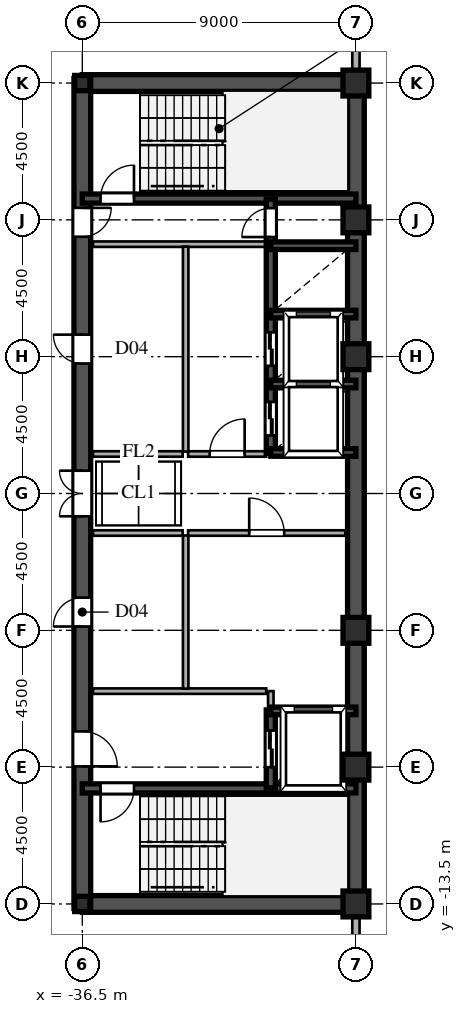
"""IFC4 building model, lengths in metres.
Left out: names, types, materials, properties, quantities, classifications, styles, units other than length and angle.
Written with IfcOpenShell. Run it as: python <this file> out.ifc"""

import sys

from ifc_helpers import new_model, si_unit, direction, frame, frame_2d, origin, origin_2d, place, context, subcontext, project, spatial, rectangle, hollow_rectangle, i_section, extrude, source, transform, mapped, element, fill, save


model = new_model("IFC4")
c1 = context("Model", 3, precision=1e-05, world=origin(), true_north=direction((0.0, 1.0)))
c2 = subcontext(c1, "Body", "Model", "MODEL_VIEW")
j1 = project(units=[si_unit("LENGTHUNIT", "METRE"), si_unit("PLANEANGLEUNIT", "RADIAN")], contexts=[c1])
p1 = place(None, origin())
s1 = spatial("IfcSite", under=j1, at=p1, CompositionType="ELEMENT")
p2 = place(p1, origin())
s2 = spatial("IfcBuilding", under=s1, at=p2, CompositionType="ELEMENT")
p3 = place(p2, frame((0.0, 0.0, 199.5)))
s3 = spatial("IfcBuildingStorey", under=s2, at=p3, CompositionType="ELEMENT", Elevation=199.5)
m1 = source(origin(), c2, "Body", "SweptSolid", [
    extrude(hollow_rectangle(XDim=0.85, YDim=0.85, WallThickness=0.036, at=origin_2d()), origin(), (0.0, 0.0, 1.0), 3.6),
])
for number, where, z_axis, x_axis in (
    (1, (-27.5, -13.5, 0.0), (0.0, 0.0, 1.0), (1.0, 0.0, 0.0)),
    (2, (-27.5, -9.0, 0.0), (0.0, 0.0, 1.0), (1.0, 0.0, 0.0)),
    (3, (-27.5, -4.5, 0.0), (0.0, 0.0, 1.0), (1.0, 0.0, 0.0)),
    (4, (-27.5, 4.5, 0.0), (0.0, 0.0, 1.0), (1.0, 0.0, 0.0)),
    (5, (-27.5, 9.0, 0.0), (0.0, 0.0, 1.0), (1.0, 0.0, 0.0)),
    (6, (-27.5, 13.5, 0.0), (0.0, 0.0, 1.0), (1.0, 0.0, 0.0)),
):
    element("IfcColumn", number, at=place(p3, frame(where, z_axis=z_axis, x_axis=x_axis)), inside=s3, PredefinedType="COLUMN", context=c2, shape_type="MappedRepresentation", body=[
        mapped(m1, transform((0.0, 0.0, 0.0), scale=1.0)),
    ])
m2 = source(origin(), c2, "Body", "SweptSolid", [
    extrude(i_section(OverallWidth=0.5, OverallDepth=0.5, WebThickness=0.02, FlangeThickness=0.032, at=origin_2d()), origin(), (0.0, 0.0, 1.0), 3.6),
])
for number, where, z_axis, x_axis in (
    (7, (-36.5, -13.5, 0.0), (0.0, 0.0, 1.0), (1.0, 0.0, 0.0)),
    (8, (-36.5, 13.5, 0.0), (0.0, 0.0, 1.0), (1.0, 0.0, 0.0)),
):
    element("IfcColumn", number, at=place(p3, frame(where, z_axis=z_axis, x_axis=x_axis)), inside=s3, PredefinedType="COLUMN", context=c2, shape_type="MappedRepresentation", body=[
        mapped(m2, transform((0.0, 0.0, 0.0), scale=1.0)),
    ])
p4 = place(p3, frame((-27.5, -15.98, 0.0), z_axis=(0.0, 0.0, 1.0), x_axis=(0.0, 1.0, 0.0)))
e9 = element("IfcWall", 9, at=p4, inside=s3, PredefinedType="SOLIDWALL", context=c2, shape_type="SweptSolid", body=[
    extrude(rectangle(XDim=1.6, YDim=0.24, at=frame_2d((0.8, 0.0))), origin(), (0.0, 0.0, 1.0), 3.38),
])
for number, where, z_axis, x_axis in (
    (10, (-27.5, -14.38, 0.0), (0.0, 0.0, 1.0), (0.0, 1.0, 0.0)),
    (11, (-27.5, 13.78, 0.0), (0.0, 0.0, 1.0), (0.0, 1.0, 0.0)),
):
    element("IfcWall", number, at=place(p3, frame(where, z_axis=z_axis, x_axis=x_axis)), inside=s3, PredefinedType="SOLIDWALL", context=c2, shape_type="SweptSolid", body=[
        extrude(rectangle(XDim=0.6, YDim=0.24, at=frame_2d((0.3, 0.0))), origin(), (0.0, 0.0, 1.0), 2.88),
    ])
p5 = place(p3, frame((-27.5, 14.38, 0.0), z_axis=(0.0, 0.0, 1.0), x_axis=(0.0, 1.0, 0.0)))
e12 = element("IfcWall", 12, at=p5, inside=s3, PredefinedType="SOLIDWALL", context=c2, shape_type="SweptSolid", body=[
    extrude(rectangle(XDim=1.6, YDim=0.24, at=frame_2d((0.8, 0.0))), origin(), (0.0, 0.0, 1.0), 3.38),
])
for number, where, z_axis, x_axis in (
    (13, (-27.5, -13.5, 0.0), (0.0, 0.0, 1.0), (0.0, 1.0, 0.0)),
    (14, (-27.5, 1.3, 0.0), (0.0, 0.0, 1.0), (0.0, 1.0, 0.0)),
):
    element("IfcWall", number, at=place(p3, frame(where, z_axis=z_axis, x_axis=x_axis)), inside=s3, PredefinedType="SHEAR", context=c2, shape_type="SweptSolid", body=[
        extrude(rectangle(XDim=12.2, YDim=0.55, at=frame_2d((6.1, 0.0))), origin(), (0.0, 0.0, 1.0), 3.38),
    ])
p6 = place(p3, frame((-27.5, -1.3, 0.0), z_axis=(0.0, 0.0, 1.0), x_axis=(0.0, 1.0, 0.0)))
e15 = element("IfcWall", 15, at=p6, inside=s3, PredefinedType="SHEAR", context=c2, shape_type="SweptSolid", body=[
    extrude(rectangle(XDim=2.6, YDim=0.55, at=frame_2d((1.3, 0.0))), origin(), (0.0, 0.0, 1.0), 3.38),
])
for number, where, z_axis, x_axis in (
    (16, (-36.5, -13.5, 0.0), (0.0, 0.0, 1.0), (1.0, 0.0, 0.0)),
    (17, (-36.5, 13.5, 0.0), (0.0, 0.0, 1.0), (1.0, 0.0, 0.0)),
):
    element("IfcWall", number, at=place(p3, frame(where, z_axis=z_axis, x_axis=x_axis)), inside=s3, PredefinedType="SHEAR", context=c2, shape_type="SweptSolid", body=[
        extrude(rectangle(XDim=9.0, YDim=0.55, at=frame_2d((4.5, 0.0))), origin(), (0.0, 0.0, 1.0), 3.38),
    ])
p7 = place(p3, frame((-36.5, -13.65, 0.0), z_axis=(0.0, 0.0, 1.0), x_axis=(0.0, 1.0, 0.0)))
e18 = element("IfcWall", 18, at=p7, inside=s3, PredefinedType="SHEAR", context=c2, shape_type="SweptSolid", body=[
    extrude(rectangle(XDim=7.15, YDim=0.55, at=frame_2d((3.575, 0.0))), origin(), (0.0, 0.0, 1.0), 3.38),
])
p8 = place(p7, frame((4.675, 0.0, 0.0)))
e19 = element("IfcOpeningElement", 19, at=p8, cuts=e18, PredefinedType="OPENING", context=c2, shape_type="SweptSolid", body=[
    extrude(rectangle(XDim=1.15, YDim=2.2, at=frame_2d((0.575, 1.1))), frame((0.0, 0.285, 0.0), z_axis=(0.0, -1.0, 0.0), x_axis=(1.0, 0.0, 0.0)), (0.0, 0.0, 1.0), 0.57),
])
p9 = place(p3, frame((-36.5, -1.3, 0.0), z_axis=(0.0, 0.0, 1.0), x_axis=(0.0, 1.0, 0.0)))
e20 = element("IfcWall", 20, at=p9, inside=s3, PredefinedType="SHEAR", context=c2, shape_type="SweptSolid", body=[
    extrude(rectangle(XDim=2.6, YDim=0.55, at=frame_2d((1.3, 0.0))), origin(), (0.0, 0.0, 1.0), 3.38),
])
p10 = place(p9, frame((0.55, 0.0, 0.0)))
e21 = element("IfcOpeningElement", 21, at=p10, cuts=e20, PredefinedType="OPENING", context=c2, shape_type="SweptSolid", body=[
    extrude(rectangle(XDim=1.5, YDim=2.3, at=frame_2d((0.75, 1.15))), frame((0.0, 0.285, 0.0), z_axis=(0.0, -1.0, 0.0), x_axis=(1.0, 0.0, 0.0)), (0.0, 0.0, 1.0), 0.57),
])
p11 = place(p3, frame((-36.5, 8.2, 0.0), z_axis=(0.0, 0.0, 1.0), x_axis=(0.0, 1.0, 0.0)))
e22 = element("IfcWall", 22, at=p11, inside=s3, PredefinedType="SHEAR", context=c2, shape_type="SweptSolid", body=[
    extrude(rectangle(XDim=5.45, YDim=0.55, at=frame_2d((2.725, 0.0))), origin(), (0.0, 0.0, 1.0), 3.38),
])
p12 = place(p11, frame((0.245, 0.0, 0.0)))
e23 = element("IfcOpeningElement", 23, at=p12, cuts=e22, PredefinedType="OPENING", context=c2, shape_type="SweptSolid", body=[
    extrude(rectangle(XDim=0.95, YDim=2.15, at=frame_2d((0.475, 1.075))), frame((0.0, 0.285, 0.0), z_axis=(0.0, -1.0, 0.0), x_axis=(1.0, 0.0, 0.0)), (0.0, 0.0, 1.0), 0.57),
])
p13 = place(p3, frame((-36.5, -6.5, 0.0), z_axis=(0.0, 0.0, 1.0), x_axis=(0.0, 1.0, 0.0)))
e24 = element("IfcWall", 24, at=p13, inside=s3, PredefinedType="SHEAR", context=c2, shape_type="SweptSolid", body=[
    extrude(rectangle(XDim=5.2, YDim=0.55, at=frame_2d((2.6, 0.0))), origin(), (0.0, 0.0, 1.0), 3.38),
])
p14 = place(p13, frame((2.125, 0.0, 0.0)))
e25 = element("IfcOpeningElement", 25, at=p14, cuts=e24, PredefinedType="OPENING", context=c2, shape_type="SweptSolid", body=[
    extrude(rectangle(XDim=0.95, YDim=2.15, at=frame_2d((0.475, 1.075))), frame((0.0, 0.285, 0.0), z_axis=(0.0, -1.0, 0.0), x_axis=(1.0, 0.0, 0.0)), (0.0, 0.0, 1.0), 0.57),
])
p15 = place(p3, frame((-36.5, 1.3, 0.0), z_axis=(0.0, 0.0, 1.0), x_axis=(0.0, 1.0, 0.0)))
e26 = element("IfcWall", 26, at=p15, inside=s3, PredefinedType="SHEAR", context=c2, shape_type="SweptSolid", body=[
    extrude(rectangle(XDim=6.9, YDim=0.55, at=frame_2d((3.45, 0.0))), origin(), (0.0, 0.0, 1.0), 3.38),
])
p16 = place(p15, frame((2.975, 0.0, 0.0)))
e27 = element("IfcOpeningElement", 27, at=p16, cuts=e26, PredefinedType="OPENING", context=c2, shape_type="SweptSolid", body=[
    extrude(rectangle(XDim=0.95, YDim=2.15, at=frame_2d((0.475, 1.075))), frame((0.0, 0.285, 0.0), z_axis=(0.0, -1.0, 0.0), x_axis=(1.0, 0.0, 0.0)), (0.0, 0.0, 1.0), 0.57),
])
p17 = place(p3, frame((-36.5, -9.7, 0.0), z_axis=(0.0, 0.0, 1.0), x_axis=(1.0, 0.0, 0.0)))
e28 = element("IfcWall", 28, at=p17, inside=s3, PredefinedType="SHEAR", context=c2, shape_type="SweptSolid", body=[
    extrude(rectangle(XDim=9.0, YDim=0.3, at=frame_2d((4.5, 0.0))), origin(), (0.0, 0.0, 1.0), 3.38),
])
p18 = place(p17, frame((0.6, 0.0, 0.0)))
e29 = element("IfcOpeningElement", 29, at=p18, cuts=e28, PredefinedType="OPENING", context=c2, shape_type="SweptSolid", body=[
    extrude(rectangle(XDim=1.1, YDim=2.2, at=frame_2d((0.55, 1.1))), frame((0.0, 0.16, 0.0), z_axis=(0.0, -1.0, 0.0), x_axis=(1.0, 0.0, 0.0)), (0.0, 0.0, 1.0), 0.32),
])
p19 = place(p3, frame((-36.5, 9.7, 0.0), z_axis=(0.0, 0.0, 1.0), x_axis=(1.0, 0.0, 0.0)))
e30 = element("IfcWall", 30, at=p19, inside=s3, PredefinedType="SHEAR", context=c2, shape_type="SweptSolid", body=[
    extrude(rectangle(XDim=9.0, YDim=0.3, at=frame_2d((4.5, 0.0))), origin(), (0.0, 0.0, 1.0), 3.38),
])
p20 = place(p19, frame((0.6, 0.0, 0.0)))
e31 = element("IfcOpeningElement", 31, at=p20, cuts=e30, PredefinedType="OPENING", context=c2, shape_type="SweptSolid", body=[
    extrude(rectangle(XDim=1.1, YDim=2.2, at=frame_2d((0.55, 1.1))), frame((0.0, 0.16, 0.0), z_axis=(0.0, -1.0, 0.0), x_axis=(1.0, 0.0, 0.0)), (0.0, 0.0, 1.0), 0.32),
])
for number, where, z_axis, x_axis in (
    (32, (-30.3, -7.15, 0.0), (0.0, 0.0, 1.0), (1.0, 0.0, 0.0)),
    (33, (-30.3, 1.35, 0.0), (0.0, 0.0, 1.0), (1.0, 0.0, 0.0)),
    (34, (-30.3, 3.6, 0.0), (0.0, 0.0, 1.0), (1.0, 0.0, 0.0)),
    (35, (-30.3, 5.9, 0.0), (0.0, 0.0, 1.0), (1.0, 0.0, 0.0)),
    (36, (-30.3, 8.15, 0.0), (0.0, 0.0, 1.0), (1.0, 0.0, 0.0)),
):
    element("IfcWall", number, at=place(p3, frame(where, z_axis=z_axis, x_axis=x_axis)), inside=s3, PredefinedType="SHEAR", context=c2, shape_type="SweptSolid", body=[
        extrude(rectangle(XDim=2.8, YDim=0.25, at=frame_2d((1.4, 0.0))), origin(), (0.0, 0.0, 1.0), 3.38),
    ])
p21 = place(p3, frame((-30.3, -9.68, 0.0), z_axis=(0.0, 0.0, 1.0), x_axis=(0.0, 1.0, 0.0)))
e37 = element("IfcWall", 37, at=p21, inside=s3, PredefinedType="SHEAR", context=c2, shape_type="SweptSolid", body=[
    extrude(rectangle(XDim=2.56, YDim=0.3, at=frame_2d((1.28, 0.0))), origin(), (0.0, 0.0, 1.0), 3.38),
])
p22 = place(p21, frame((0.68, 0.0, 0.0)))
e38 = element("IfcOpeningElement", 38, at=p22, cuts=e37, PredefinedType="OPENING", context=c2, shape_type="SweptSolid", body=[
    extrude(rectangle(XDim=1.2, YDim=2.25, at=frame_2d((0.6, 1.125))), frame((0.0, 0.16, 0.0), z_axis=(0.0, -1.0, 0.0), x_axis=(1.0, 0.0, 0.0)), (0.0, 0.0, 1.0), 0.32),
])
p23 = place(p3, frame((-30.3, 1.32, 0.0), z_axis=(0.0, 0.0, 1.0), x_axis=(0.0, 1.0, 0.0)))
e39 = element("IfcWall", 39, at=p23, inside=s3, PredefinedType="SHEAR", context=c2, shape_type="SweptSolid", body=[
    extrude(rectangle(XDim=2.28, YDim=0.3, at=frame_2d((1.14, 0.0))), origin(), (0.0, 0.0, 1.0), 3.38),
])
p24 = place(p23, frame((0.59, 0.0, 0.0)))
e40 = element("IfcOpeningElement", 40, at=p24, cuts=e39, PredefinedType="OPENING", context=c2, shape_type="SweptSolid", body=[
    extrude(rectangle(XDim=1.1, YDim=2.2, at=frame_2d((0.55, 1.1))), frame((0.0, 0.16, 0.0), z_axis=(0.0, -1.0, 0.0), x_axis=(1.0, 0.0, 0.0)), (0.0, 0.0, 1.0), 0.32),
])
p25 = place(p3, frame((-30.3, 3.6, 0.0), z_axis=(0.0, 0.0, 1.0), x_axis=(0.0, 1.0, 0.0)))
e41 = element("IfcWall", 41, at=p25, inside=s3, PredefinedType="SHEAR", context=c2, shape_type="SweptSolid", body=[
    extrude(rectangle(XDim=2.3, YDim=0.3, at=frame_2d((1.15, 0.0))), origin(), (0.0, 0.0, 1.0), 3.38),
])
p26 = place(p25, frame((0.6, 0.0, 0.0)))
e42 = element("IfcOpeningElement", 42, at=p26, cuts=e41, PredefinedType="OPENING", context=c2, shape_type="SweptSolid", body=[
    extrude(rectangle(XDim=1.1, YDim=2.2, at=frame_2d((0.55, 1.1))), frame((0.0, 0.16, 0.0), z_axis=(0.0, -1.0, 0.0), x_axis=(1.0, 0.0, 0.0)), (0.0, 0.0, 1.0), 0.32),
])
p27 = place(p3, frame((-30.3, 5.9, 0.0), z_axis=(0.0, 0.0, 1.0), x_axis=(0.0, 1.0, 0.0)))
e43 = element("IfcWall", 43, at=p27, inside=s3, PredefinedType="SHEAR", context=c2, shape_type="SweptSolid", body=[
    extrude(rectangle(XDim=2.25, YDim=0.3, at=frame_2d((1.125, 0.0))), origin(), (0.0, 0.0, 1.0), 3.38),
])
p28 = place(p3, frame((-30.3, 8.15, 0.0), z_axis=(0.0, 0.0, 1.0), x_axis=(0.0, 1.0, 0.0)))
e44 = element("IfcWall", 44, at=p28, inside=s3, PredefinedType="SHEAR", context=c2, shape_type="SweptSolid", body=[
    extrude(rectangle(XDim=1.53, YDim=0.3, at=frame_2d((0.765, 0.0))), origin(), (0.0, 0.0, 1.0), 3.38),
])
p29 = place(p28, frame((0.285, 0.0, 0.0)))
e45 = element("IfcOpeningElement", 45, at=p29, cuts=e44, PredefinedType="OPENING", context=c2, shape_type="SweptSolid", body=[
    extrude(rectangle(XDim=0.95, YDim=2.15, at=frame_2d((0.475, 1.075))), frame((0.0, 0.16, 0.0), z_axis=(0.0, -1.0, 0.0), x_axis=(1.0, 0.0, 0.0)), (0.0, 0.0, 1.0), 0.32),
])
p30 = place(p3, frame((-36.15, -6.5, 0.0), z_axis=(0.0, 0.0, 1.0), x_axis=(1.0, 0.0, 0.0)))
e46 = element("IfcWall", 46, at=p30, inside=s3, PredefinedType="PARTITIONING", context=c2, shape_type="SweptSolid", body=[
    extrude(rectangle(XDim=5.7, YDim=0.18, at=frame_2d((2.85, 0.0))), origin(), (0.0, 0.0, 1.0), 3.38),
])
p31 = place(p3, frame((-30.3, -7.12, 0.0), z_axis=(0.0, 0.0, 1.0), x_axis=(0.0, 1.0, 0.0)))
e47 = element("IfcWall", 47, at=p31, inside=s3, PredefinedType="PARTITIONING", context=c2, shape_type="SweptSolid", body=[
    extrude(rectangle(XDim=0.62, YDim=0.18, at=frame_2d((0.31, 0.0))), origin(), (0.0, 0.0, 1.0), 3.38),
])
p32 = place(p3, frame((-36.15, 8.2, 0.0), z_axis=(0.0, 0.0, 1.0), x_axis=(1.0, 0.0, 0.0)))
e48 = element("IfcWall", 48, at=p32, inside=s3, PredefinedType="PARTITIONING", context=c2, shape_type="SweptSolid", body=[
    extrude(rectangle(XDim=5.7, YDim=0.18, at=frame_2d((2.85, 0.0))), origin(), (0.0, 0.0, 1.0), 3.38),
])
p33 = place(p3, frame((-33.1, -6.42, 0.0), z_axis=(0.0, 0.0, 1.0), x_axis=(0.0, 1.0, 0.0)))
e49 = element("IfcWall", 49, at=p33, inside=s3, PredefinedType="PARTITIONING", context=c2, shape_type="SweptSolid", body=[
    extrude(rectangle(XDim=5.04, YDim=0.18, at=frame_2d((2.52, 0.0))), origin(), (0.0, 0.0, 1.0), 3.38),
])
p34 = place(p3, frame((-33.1, 1.38, 0.0), z_axis=(0.0, 0.0, 1.0), x_axis=(0.0, 1.0, 0.0)))
e50 = element("IfcWall", 50, at=p34, inside=s3, PredefinedType="PARTITIONING", context=c2, shape_type="SweptSolid", body=[
    extrude(rectangle(XDim=6.74, YDim=0.18, at=frame_2d((3.37, 0.0))), origin(), (0.0, 0.0, 1.0), 3.38),
])
p35 = place(p3, frame((-33.02, -1.3, 0.0), z_axis=(0.0, 0.0, 1.0), x_axis=(1.0, 0.0, 0.0)))
e51 = element("IfcWall", 51, at=p35, inside=s3, PredefinedType="PARTITIONING", context=c2, shape_type="SweptSolid", body=[
    extrude(rectangle(XDim=5.17, YDim=0.18, at=frame_2d((2.585, 0.0))), origin(), (0.0, 0.0, 1.0), 3.38),
])
p36 = place(p35, frame((2.01, 0.0, 0.0)))
e52 = element("IfcOpeningElement", 52, at=p36, cuts=e51, PredefinedType="OPENING", context=c2, shape_type="SweptSolid", body=[
    extrude(rectangle(XDim=1.15, YDim=2.2, at=frame_2d((0.575, 1.1))), frame((0.0, 0.1, 0.0), z_axis=(0.0, -1.0, 0.0), x_axis=(1.0, 0.0, 0.0)), (0.0, 0.0, 1.0), 0.2),
])
p37 = place(p3, frame((-33.02, 1.3, 0.0), z_axis=(0.0, 0.0, 1.0), x_axis=(1.0, 0.0, 0.0)))
e53 = element("IfcWall", 53, at=p37, inside=s3, PredefinedType="PARTITIONING", context=c2, shape_type="SweptSolid", body=[
    extrude(rectangle(XDim=2.57, YDim=0.18, at=frame_2d((1.285, 0.0))), origin(), (0.0, 0.0, 1.0), 3.38),
])
p38 = place(p37, frame((0.71, 0.0, 0.0)))
e54 = element("IfcOpeningElement", 54, at=p38, cuts=e53, PredefinedType="OPENING", context=c2, shape_type="SweptSolid", body=[
    extrude(rectangle(XDim=1.15, YDim=2.2, at=frame_2d((0.575, 1.1))), frame((0.0, 0.1, 0.0), z_axis=(0.0, -1.0, 0.0), x_axis=(1.0, 0.0, 0.0)), (0.0, 0.0, 1.0), 0.2),
])
for number, where, z_axis, x_axis in (
    (55, (-36.15, -1.3, 0.0), (0.0, 0.0, 1.0), (1.0, 0.0, 0.0)),
    (56, (-36.15, 1.3, 0.0), (0.0, 0.0, 1.0), (1.0, 0.0, 0.0)),
):
    element("IfcWall", number, at=place(p3, frame(where, z_axis=z_axis, x_axis=x_axis)), inside=s3, PredefinedType="PARTITIONING", context=c2, shape_type="SweptSolid", body=[
        extrude(rectangle(XDim=2.95, YDim=0.18, at=frame_2d((1.475, 0.0))), origin(), (0.0, 0.0, 1.0), 3.38),
    ])
m3 = source(origin(), c2, "Body", "SweptSolid", [
    extrude(rectangle(XDim=1.15, YDim=2.2, at=frame_2d((0.575, 1.1))), frame((0.0, 0.025, 0.0), z_axis=(0.0, -1.0, 0.0), x_axis=(1.0, 0.0, 0.0)), (0.0, 0.0, 1.0), 0.05),
])
p39 = place(p8, frame((1.15, 0.0, 0.0), z_axis=(0.0, 0.0, 1.0), x_axis=(-1.0, 0.0, 0.0)))
e57 = element("IfcDoor", 57, at=p39, inside=s3, OperationType="SINGLE_SWING_LEFT", PredefinedType="DOOR", context=c2, shape_type="MappedRepresentation", body=[
    mapped(m3, transform((0.0, 0.0, 0.0), scale=1.0)),
])
fill(e19, e57)
m4 = source(origin(), c2, "Body", "SweptSolid", [
    extrude(rectangle(XDim=1.5, YDim=2.3, at=frame_2d((0.75, 1.15))), frame((0.0, 0.025, 0.0), z_axis=(0.0, -1.0, 0.0), x_axis=(1.0, 0.0, 0.0)), (0.0, 0.0, 1.0), 0.05),
])
p40 = place(p10, origin())
e58 = element("IfcDoor", 58, at=p40, inside=s3, OperationType="DOUBLE_SWING_LEFT", PredefinedType="DOOR", context=c2, shape_type="MappedRepresentation", body=[
    mapped(m4, transform((0.0, 0.0, 0.0), scale=1.0)),
])
fill(e21, e58)
m5 = source(origin(), c2, "Body", "SweptSolid", [
    extrude(rectangle(XDim=0.95, YDim=2.15, at=frame_2d((0.475, 1.075))), frame((0.0, 0.025, 0.0), z_axis=(0.0, -1.0, 0.0), x_axis=(1.0, 0.0, 0.0)), (0.0, 0.0, 1.0), 0.05),
])
p41 = place(p12, frame((0.95, 0.0, 0.0), z_axis=(0.0, 0.0, 1.0), x_axis=(-1.0, 0.0, 0.0)))
e59 = element("IfcDoor", 59, at=p41, inside=s3, OperationType="SINGLE_SWING_RIGHT", PredefinedType="DOOR", context=c2, shape_type="MappedRepresentation", body=[
    mapped(m5, transform((0.0, 0.0, 0.0), scale=1.0)),
])
fill(e23, e59)
p42 = place(p14, origin())
e60 = element("IfcDoor", 60, at=p42, inside=s3, OperationType="SINGLE_SWING_LEFT", PredefinedType="DOOR", context=c2, shape_type="MappedRepresentation", body=[
    mapped(m5, transform((0.0, 0.0, 0.0), scale=1.0)),
])
fill(e25, e60)
p43 = place(p16, origin())
e61 = element("IfcDoor", 61, at=p43, inside=s3, OperationType="SINGLE_SWING_RIGHT", PredefinedType="DOOR", context=c2, shape_type="MappedRepresentation", body=[
    mapped(m5, transform((0.0, 0.0, 0.0), scale=1.0)),
])
fill(e27, e61)
m6 = source(origin(), c2, "Body", "SweptSolid", [
    extrude(rectangle(XDim=1.1, YDim=2.2, at=frame_2d((0.55, 1.1))), frame((0.0, 0.025, 0.0), z_axis=(0.0, -1.0, 0.0), x_axis=(1.0, 0.0, 0.0)), (0.0, 0.0, 1.0), 0.05),
])
p44 = place(p18, frame((1.1, 0.0, 0.0), z_axis=(0.0, 0.0, 1.0), x_axis=(-1.0, 0.0, 0.0)))
e62 = element("IfcDoor", 62, at=p44, inside=s3, OperationType="SINGLE_SWING_LEFT", PredefinedType="DOOR", context=c2, shape_type="MappedRepresentation", body=[
    mapped(m6, transform((0.0, 0.0, 0.0), scale=1.0)),
])
fill(e29, e62)
p45 = place(p20, origin())
e63 = element("IfcDoor", 63, at=p45, inside=s3, OperationType="SINGLE_SWING_RIGHT", PredefinedType="DOOR", context=c2, shape_type="MappedRepresentation", body=[
    mapped(m6, transform((0.0, 0.0, 0.0), scale=1.0)),
])
fill(e31, e63)
m7 = source(origin(), c2, "Body", "SweptSolid", [
    extrude(rectangle(XDim=1.2, YDim=2.25, at=frame_2d((0.6, 1.125))), frame((0.0, 0.025, 0.0), z_axis=(0.0, -1.0, 0.0), x_axis=(1.0, 0.0, 0.0)), (0.0, 0.0, 1.0), 0.05),
])
p46 = place(p22, origin())
e64 = element("IfcDoor", 64, at=p46, inside=s3, OperationType="DOUBLE_DOOR_SLIDING", PredefinedType="DOOR", context=c2, shape_type="MappedRepresentation", body=[
    mapped(m7, transform((0.0, 0.0, 0.0), scale=1.0)),
])
fill(e38, e64)
m8 = source(origin(), c2, "Body", "SweptSolid", [
    extrude(rectangle(XDim=1.1, YDim=2.2, at=frame_2d((0.55, 1.1))), frame((0.0, 0.025, 0.0), z_axis=(0.0, -1.0, 0.0), x_axis=(1.0, 0.0, 0.0)), (0.0, 0.0, 1.0), 0.05),
])
p47 = place(p24, origin())
e65 = element("IfcDoor", 65, at=p47, inside=s3, OperationType="DOUBLE_DOOR_SLIDING", PredefinedType="DOOR", context=c2, shape_type="MappedRepresentation", body=[
    mapped(m8, transform((0.0, 0.0, 0.0), scale=1.0)),
])
fill(e40, e65)
p48 = place(p26, origin())
e66 = element("IfcDoor", 66, at=p48, inside=s3, OperationType="DOUBLE_DOOR_SLIDING", PredefinedType="DOOR", context=c2, shape_type="MappedRepresentation", body=[
    mapped(m8, transform((0.0, 0.0, 0.0), scale=1.0)),
])
fill(e42, e66)
p49 = place(p29, origin())
e67 = element("IfcDoor", 67, at=p49, inside=s3, OperationType="SINGLE_SWING_LEFT", PredefinedType="DOOR", context=c2, shape_type="MappedRepresentation", body=[
    mapped(m5, transform((0.0, 0.0, 0.0), scale=1.0)),
])
fill(e45, e67)
p50 = place(p36, origin())
e68 = element("IfcDoor", 68, at=p50, inside=s3, OperationType="SINGLE_SWING_LEFT", PredefinedType="DOOR", context=c2, shape_type="MappedRepresentation", body=[
    mapped(m3, transform((0.0, 0.0, 0.0), scale=1.0)),
])
fill(e52, e68)
p51 = place(p38, origin())
e69 = element("IfcDoor", 69, at=p51, inside=s3, OperationType="SINGLE_SWING_RIGHT", PredefinedType="DOOR", context=c2, shape_type="MappedRepresentation", body=[
    mapped(m3, transform((0.0, 0.0, 0.0), scale=1.0)),
])
fill(e54, e69)
save(model, sys.argv[1])
